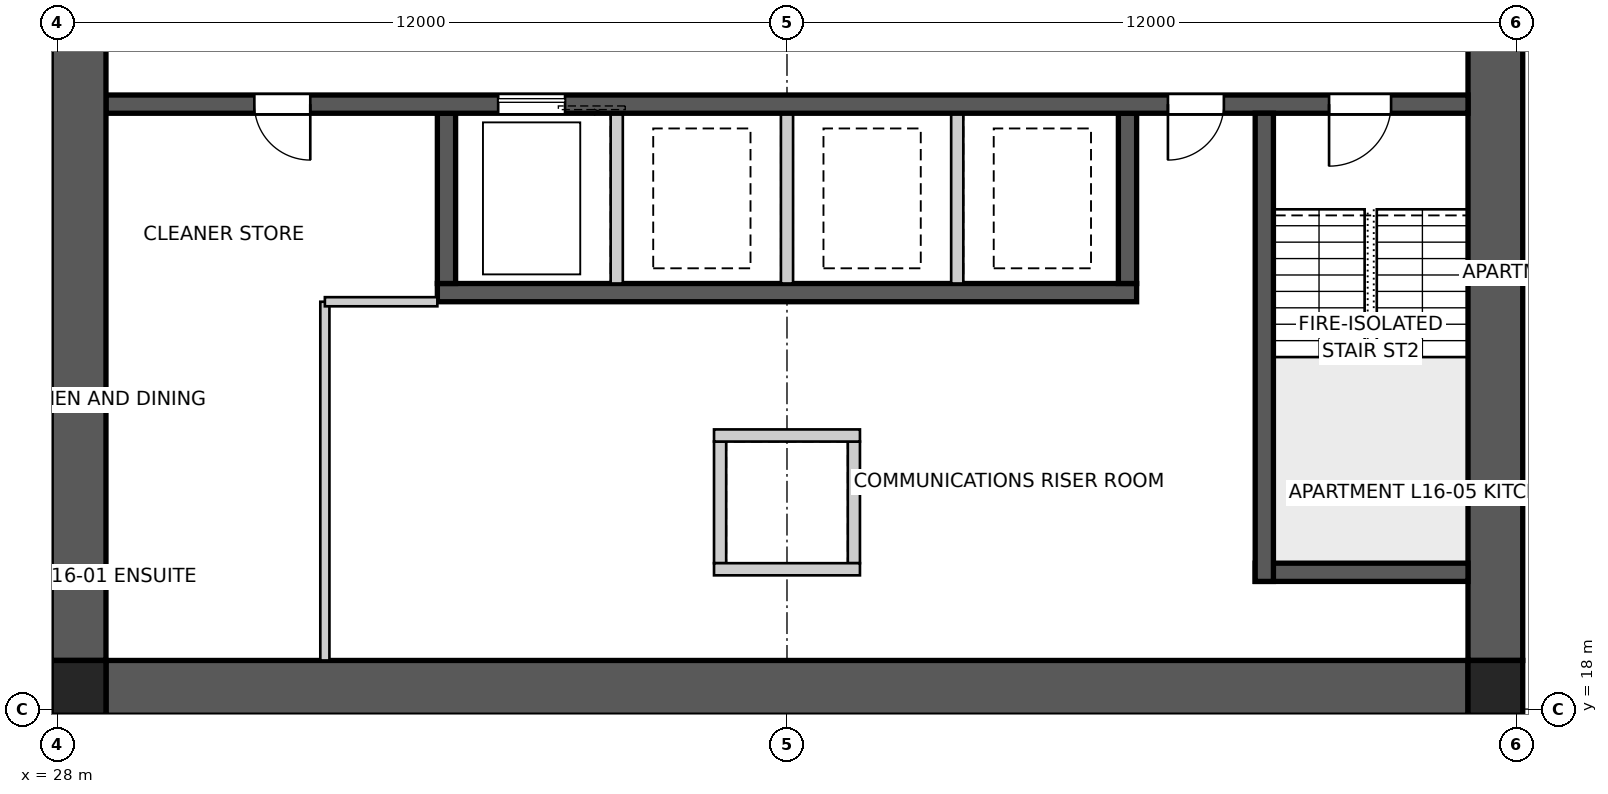
"""IFC4 building model, lengths in metres.
Left out: names, types, materials, properties, quantities, classifications, styles, units other than length and angle.
Written with IfcOpenShell. Run it as: python <this file> out.ifc"""

import sys

from ifc_helpers import new_model, si_unit, direction, frame, frame_2d, origin, origin_2d, place, context, subcontext, project, spatial, polyline, rectangle, outline, extrude, element, fill, save


model = new_model("IFC4")
c1 = context("Model", 3, precision=1e-05, world=origin(), true_north=direction((0.0, 1.0)))
c2 = subcontext(c1, "Body", "Model", "MODEL_VIEW")
j1 = project(units=[si_unit("LENGTHUNIT", "METRE"), si_unit("PLANEANGLEUNIT", "RADIAN")], contexts=[c1])
p1 = place(None, origin())
s1 = spatial("IfcSite", under=j1, at=p1, CompositionType="ELEMENT")
p2 = place(p1, origin())
s2 = spatial("IfcBuilding", under=s1, at=p2, CompositionType="ELEMENT")
p3 = place(p2, frame((0.0, 0.0, 60.8)))
s3 = spatial("IfcBuildingStorey", under=s2, at=p3, CompositionType="ELEMENT", Elevation=60.8)
p4 = place(p3, frame((51.2, 18.35, 0.0), z_axis=(0.0, 0.0, 1.0), x_axis=(-1.0, 0.0, 0.0)))
e1 = element("IfcWall", 1, at=p4, inside=s3, PredefinedType="SHEAR", context=c2, shape_type="SweptSolid", body=[
    extrude(outline(polyline([(0.0, -0.45), (22.4, -0.45), (22.4, -0.025), (22.85, -0.025), (22.85, 0.025), (22.4, 0.025), (22.4, 0.45), (0.0, 0.45), (0.0, 0.025), (-0.45, 0.025), (-0.45, -0.025), (0.0, -0.025), (0.0, -0.45)])), origin(), (0.0, 0.0, 1.0), 3.4),
])
p5 = place(p3, frame((51.65, 18.8, 0.0), z_axis=(0.0, 0.0, 1.0), x_axis=(0.0, 1.0, 0.0)))
e2 = element("IfcWall", 2, at=p5, inside=s3, PredefinedType="SHEAR", context=c2, shape_type="SweptSolid", body=[
    extrude(outline(polyline([(0.0, -0.45), (22.4, -0.45), (22.4, -0.025), (22.85, -0.025), (22.85, 0.025), (22.4, 0.025), (22.4, 0.45), (0.0, 0.45), (0.0, 0.025), (-0.45, 0.025), (-0.45, -0.025), (0.0, -0.025), (0.0, -0.45)])), origin(), (0.0, 0.0, 1.0), 3.4),
])
p6 = place(p5, frame((11.14, 0.0, 0.0)))
e3 = element("IfcOpeningElement", 3, at=p6, cuts=e2, PredefinedType="OPENING", context=c2, shape_type="SweptSolid", body=[
    extrude(rectangle(XDim=1.02, YDim=2.4, at=frame_2d((0.51, 1.2))), frame((0.0, 0.46, 0.0), z_axis=(0.0, -1.0, 0.0), x_axis=(1.0, 0.0, 0.0)), (0.0, 0.0, 1.0), 0.92),
])
p7 = place(p3, frame((28.35, 41.2, 0.0), z_axis=(0.0, 0.0, 1.0), x_axis=(0.0, -1.0, 0.0)))
e4 = element("IfcWall", 4, at=p7, inside=s3, PredefinedType="SHEAR", context=c2, shape_type="SweptSolid", body=[
    extrude(outline(polyline([(0.0, -0.45), (22.4, -0.45), (22.4, -0.025), (22.85, -0.025), (22.85, 0.025), (22.4, 0.025), (22.4, 0.45), (0.0, 0.45), (0.0, 0.025), (-0.45, 0.025), (-0.45, -0.025), (0.0, -0.025), (0.0, -0.45)])), origin(), (0.0, 0.0, 1.0), 3.4),
])
p8 = place(p7, frame((11.14, 0.0, 0.0)))
e5 = element("IfcOpeningElement", 5, at=p8, cuts=e4, PredefinedType="OPENING", context=c2, shape_type="SweptSolid", body=[
    extrude(rectangle(XDim=1.02, YDim=2.4, at=frame_2d((0.51, 1.2))), frame((0.0, 0.46, 0.0), z_axis=(0.0, -1.0, 0.0), x_axis=(1.0, 0.0, 0.0)), (0.0, 0.0, 1.0), 0.92),
])
p9 = place(p3, frame((51.2, 27.95, 0.0), z_axis=(0.0, 0.0, 1.0), x_axis=(-1.0, 0.0, 0.0)))
e6 = element("IfcWall", 6, at=p9, inside=s3, PredefinedType="SHEAR", context=c2, shape_type="SweptSolid", body=[
    extrude(rectangle(XDim=22.4, YDim=0.3, at=frame_2d((11.2, 0.0))), origin(), (0.0, 0.0, 1.0), 3.4),
])
p10 = place(p9, frame((19.04, 0.0, 0.0)))
e7 = element("IfcOpeningElement", 7, at=p10, cuts=e6, PredefinedType="OPENING", context=c2, shape_type="SweptSolid", body=[
    extrude(rectangle(XDim=0.92, YDim=2.1, at=frame_2d((0.46, 1.05))), frame((0.0, 0.16, 0.0), z_axis=(0.0, -1.0, 0.0), x_axis=(1.0, 0.0, 0.0)), (0.0, 0.0, 1.0), 0.32),
])
p11 = place(p9, frame((1.265, 0.0, 0.0)))
e8 = element("IfcOpeningElement", 8, at=p11, cuts=e6, PredefinedType="OPENING", context=c2, shape_type="SweptSolid", body=[
    extrude(rectangle(XDim=1.02, YDim=2.1, at=frame_2d((0.51, 1.05))), frame((0.0, 0.16, 0.0), z_axis=(0.0, -1.0, 0.0), x_axis=(1.0, 0.0, 0.0)), (0.0, 0.0, 1.0), 0.32),
])
p12 = place(p9, frame((4.015, 0.0, 0.0)))
e9 = element("IfcOpeningElement", 9, at=p12, cuts=e6, PredefinedType="OPENING", context=c2, shape_type="SweptSolid", body=[
    extrude(rectangle(XDim=0.92, YDim=2.1, at=frame_2d((0.46, 1.05))), frame((0.0, 0.16, 0.0), z_axis=(0.0, -1.0, 0.0), x_axis=(1.0, 0.0, 0.0)), (0.0, 0.0, 1.0), 0.32),
])
p13 = place(p9, frame((14.85, 0.0, 0.0)))
e10 = element("IfcOpeningElement", 10, at=p13, cuts=e6, PredefinedType="OPENING", context=c2, shape_type="SweptSolid", body=[
    extrude(rectangle(XDim=1.1, YDim=2.1, at=frame_2d((0.55, 1.05))), frame((0.0, 0.16, 0.0), z_axis=(0.0, -1.0, 0.0), x_axis=(1.0, 0.0, 0.0)), (0.0, 0.0, 1.0), 0.32),
])
p14 = place(p3, frame((45.75, 24.85, 0.0), z_axis=(0.0, 0.0, 1.0), x_axis=(-1.0, 0.0, 0.0)))
e11 = element("IfcWall", 11, at=p14, inside=s3, PredefinedType="SHEAR", context=c2, shape_type="SweptSolid", body=[
    extrude(rectangle(XDim=11.5, YDim=0.3, at=frame_2d((5.75, 0.0))), origin(), (0.0, 0.0, 1.0), 3.4),
])
p15 = place(p3, frame((45.6, 27.8, 0.0), z_axis=(0.0, 0.0, 1.0), x_axis=(0.0, -1.0, 0.0)))
e12 = element("IfcWall", 12, at=p15, inside=s3, PredefinedType="SHEAR", context=c2, shape_type="SweptSolid", body=[
    extrude(rectangle(XDim=2.8, YDim=0.3, at=frame_2d((1.4, 0.0))), origin(), (0.0, 0.0, 1.0), 3.4),
])
for number, where, z_axis, x_axis in (
    (13, (42.8, 27.8, 0.0), (0.0, 0.0, 1.0), (0.0, -1.0, 0.0)),
    (14, (40.0, 27.8, 0.0), (0.0, 0.0, 1.0), (0.0, -1.0, 0.0)),
    (15, (37.2, 27.8, 0.0), (0.0, 0.0, 1.0), (0.0, -1.0, 0.0)),
):
    element("IfcWall", number, at=place(p3, frame(where, z_axis=z_axis, x_axis=x_axis)), inside=s3, PredefinedType="SOLIDWALL", context=c2, shape_type="SweptSolid", body=[
        extrude(rectangle(XDim=2.8, YDim=0.2, at=frame_2d((1.4, 0.0))), origin(), (0.0, 0.0, 1.0), 3.4),
    ])
p16 = place(p3, frame((34.4, 27.8, 0.0), z_axis=(0.0, 0.0, 1.0), x_axis=(0.0, -1.0, 0.0)))
e16 = element("IfcWall", 16, at=p16, inside=s3, PredefinedType="SHEAR", context=c2, shape_type="SweptSolid", body=[
    extrude(rectangle(XDim=2.8, YDim=0.3, at=frame_2d((1.4, 0.0))), origin(), (0.0, 0.0, 1.0), 3.4),
])
p17 = place(p3, frame((47.85, 27.8, 0.0), z_axis=(0.0, 0.0, 1.0), x_axis=(0.0, -1.0, 0.0)))
e17 = element("IfcWall", 17, at=p17, inside=s3, PredefinedType="SHEAR", context=c2, shape_type="SweptSolid", body=[
    extrude(rectangle(XDim=7.7, YDim=0.3, at=frame_2d((3.85, 0.0))), origin(), (0.0, 0.0, 1.0), 3.4),
])
p18 = place(p3, frame((51.2, 20.25, 0.0), z_axis=(0.0, 0.0, 1.0), x_axis=(-1.0, 0.0, 0.0)))
e18 = element("IfcWall", 18, at=p18, inside=s3, PredefinedType="SHEAR", context=c2, shape_type="SweptSolid", body=[
    extrude(rectangle(XDim=3.5, YDim=0.3, at=frame_2d((1.75, 0.0))), origin(), (0.0, 0.0, 1.0), 3.4),
])
for number, where, z_axis, x_axis in (
    (19, (38.9, 22.4, 0.0), (0.0, 0.0, 1.0), (0.0, -1.0, 0.0)),
    (20, (41.1, 22.4, 0.0), (0.0, 0.0, 1.0), (0.0, -1.0, 0.0)),
):
    element("IfcWall", number, at=place(p3, frame(where, z_axis=z_axis, x_axis=x_axis)), inside=s3, PredefinedType="SOLIDWALL", context=c2, shape_type="SweptSolid", body=[
        extrude(rectangle(XDim=2.0, YDim=0.2, at=frame_2d((1.0, 0.0))), origin(), (0.0, 0.0, 1.0), 3.4),
    ])
for number, where, z_axis, x_axis in (
    (21, (38.8, 22.5, 0.0), (0.0, 0.0, 1.0), (1.0, 0.0, 0.0)),
    (22, (38.8, 20.3, 0.0), (0.0, 0.0, 1.0), (1.0, 0.0, 0.0)),
):
    element("IfcWall", number, at=place(p3, frame(where, z_axis=z_axis, x_axis=x_axis)), inside=s3, PredefinedType="SOLIDWALL", context=c2, shape_type="SweptSolid", body=[
        extrude(rectangle(XDim=2.4, YDim=0.2, at=frame_2d((1.2, 0.0))), origin(), (0.0, 0.0, 1.0), 3.4),
    ])
for number, where, z_axis, x_axis in (
    (23, (28.35, 18.35, 0.0), (0.0, 0.0, 1.0), (1.0, 0.0, 0.0)),
    (24, (51.65, 18.35, 0.0), (0.0, 0.0, 1.0), (1.0, 0.0, 0.0)),
):
    element("IfcColumn", number, at=place(p3, frame(where, z_axis=z_axis, x_axis=x_axis)), inside=s3, PredefinedType="COLUMN", context=c2, shape_type="SweptSolid", body=[
        extrude(rectangle(XDim=0.9, YDim=0.9, at=origin_2d()), origin(), (0.0, 0.0, 1.0), 3.4),
    ])
p19 = place(p3, frame((32.4, 18.8, 0.0), z_axis=(0.0, 0.0, 1.0), x_axis=(0.0, 1.0, 0.0)))
e25 = element("IfcWall", 25, at=p19, inside=s3, PredefinedType="SOLIDWALL", context=c2, shape_type="SweptSolid", body=[
    extrude(rectangle(XDim=5.9, YDim=0.15, at=frame_2d((2.95, 0.0))), origin(), (0.0, 0.0, 1.0), 3.25),
])
p20 = place(p3, frame((32.4, 24.7, 0.0), z_axis=(0.0, 0.0, 1.0), x_axis=(1.0, 0.0, 0.0)))
e26 = element("IfcWall", 26, at=p20, inside=s3, PredefinedType="SOLIDWALL", context=c2, shape_type="SweptSolid", body=[
    extrude(rectangle(XDim=1.85, YDim=0.15, at=frame_2d((0.925, 0.0))), origin(), (0.0, 0.0, 1.0), 3.25),
])
p21 = place(p10, origin())
e27 = element("IfcDoor", 27, at=p21, inside=s3, OperationType="SINGLE_SWING_LEFT", PredefinedType="DOOR", context=c2, shape_type="SweptSolid", body=[
    extrude(rectangle(XDim=0.92, YDim=2.1, at=frame_2d((0.46, 1.05))), frame((0.0, 0.025, 0.0), z_axis=(0.0, -1.0, 0.0), x_axis=(1.0, 0.0, 0.0)), (0.0, 0.0, 1.0), 0.05),
])
fill(e7, e27)
p22 = place(p11, origin())
e28 = element("IfcDoor", 28, at=p22, inside=s3, OperationType="SINGLE_SWING_RIGHT", PredefinedType="DOOR", context=c2, shape_type="SweptSolid", body=[
    extrude(rectangle(XDim=1.02, YDim=2.1, at=frame_2d((0.51, 1.05))), frame((0.0, 0.025, 0.0), z_axis=(0.0, -1.0, 0.0), x_axis=(1.0, 0.0, 0.0)), (0.0, 0.0, 1.0), 0.05),
])
fill(e8, e28)
p23 = place(p12, origin())
e29 = element("IfcDoor", 29, at=p23, inside=s3, OperationType="SINGLE_SWING_RIGHT", PredefinedType="DOOR", context=c2, shape_type="SweptSolid", body=[
    extrude(rectangle(XDim=0.92, YDim=2.1, at=frame_2d((0.46, 1.05))), frame((0.0, 0.025, 0.0), z_axis=(0.0, -1.0, 0.0), x_axis=(1.0, 0.0, 0.0)), (0.0, 0.0, 1.0), 0.05),
])
fill(e9, e29)
p24 = place(p13, origin())
e30 = element("IfcDoor", 30, at=p24, inside=s3, OperationType="SLIDING_TO_LEFT", PredefinedType="DOOR", context=c2, shape_type="SweptSolid", body=[
    extrude(rectangle(XDim=1.1, YDim=2.1, at=frame_2d((0.55, 1.05))), frame((0.0, 0.025, 0.0), z_axis=(0.0, -1.0, 0.0), x_axis=(1.0, 0.0, 0.0)), (0.0, 0.0, 1.0), 0.05),
])
fill(e10, e30)
save(model, sys.argv[1])
